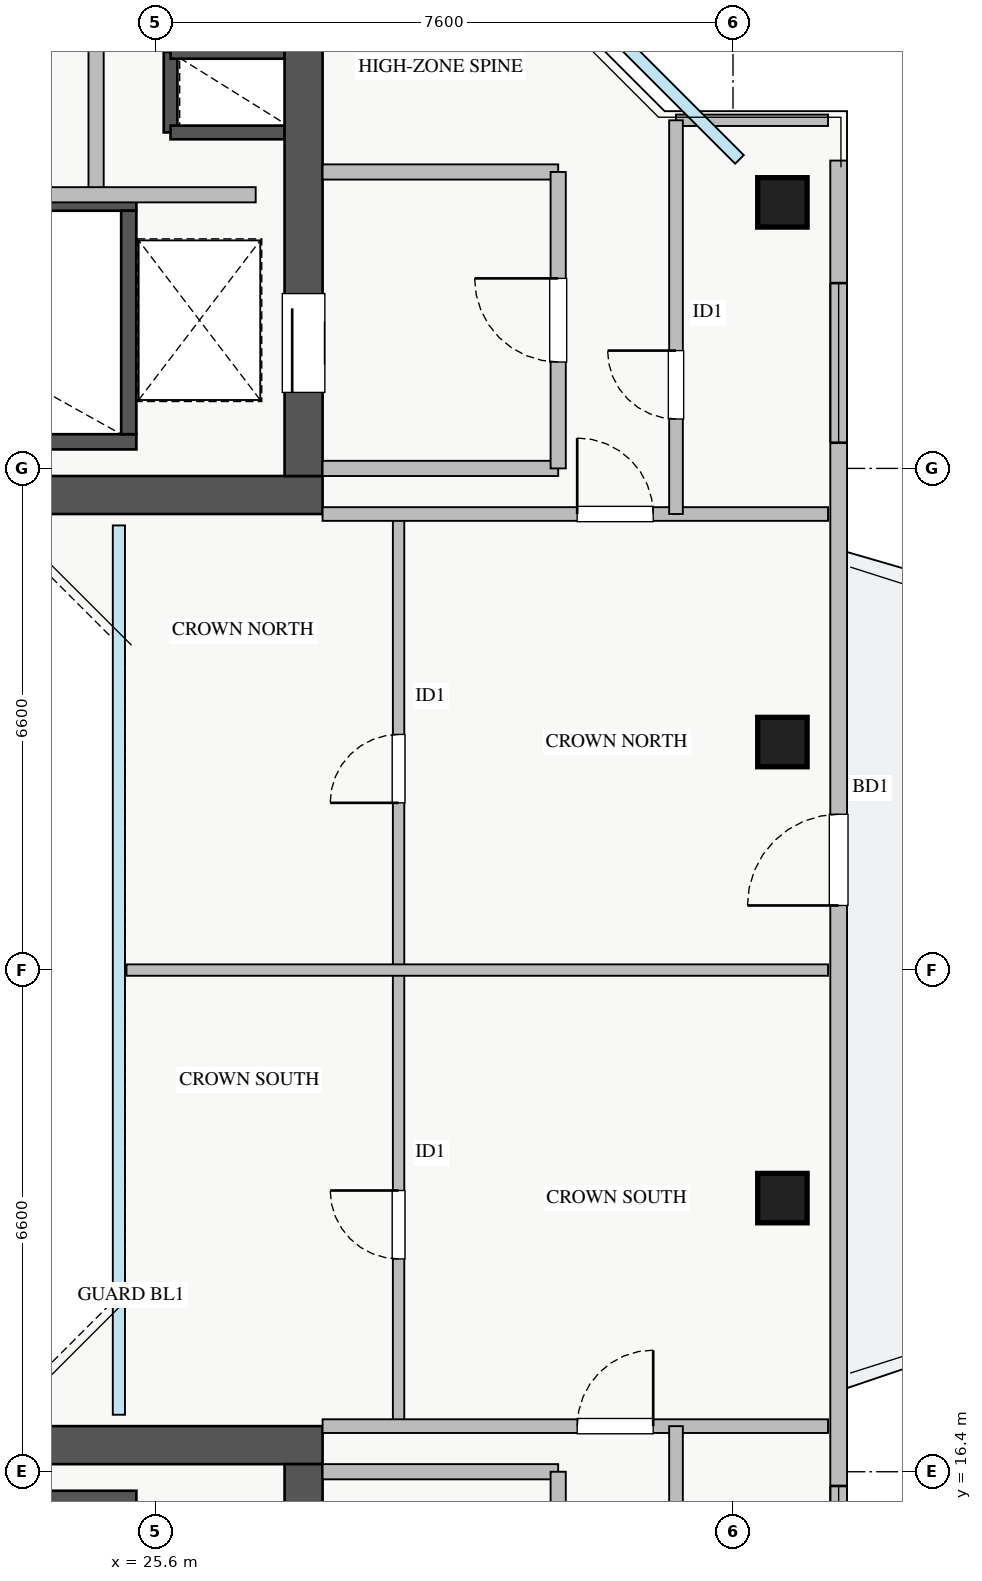
"""IFC4 building model, lengths in metres.
Left out: names, types, materials, properties, quantities, classifications, styles, units other than length and angle.
Written with IfcOpenShell. Run it as: python <this file> out.ifc"""

import sys

from ifc_helpers import new_model, si_unit, direction, frame, frame_2d, origin, origin_2d, place, context, subcontext, project, spatial, rectangle, extrude, source, transform, mapped, element, fill, save


model = new_model("IFC4")
c1 = context("Model", 3, precision=1e-05, world=origin(), true_north=direction((0.0, 1.0)))
c2 = subcontext(c1, "Body", "Model", "MODEL_VIEW")
j1 = project(units=[si_unit("LENGTHUNIT", "METRE"), si_unit("PLANEANGLEUNIT", "RADIAN")], contexts=[c1])
p1 = place(None, origin())
s1 = spatial("IfcSite", under=j1, at=p1, CompositionType="ELEMENT")
p2 = place(p1, origin())
s2 = spatial("IfcBuilding", under=s1, at=p2, CompositionType="ELEMENT")
p3 = place(p2, frame((0.0, 0.0, 237.25)))
s3 = spatial("IfcBuildingStorey", under=s2, at=p3, CompositionType="ELEMENT", Elevation=237.25)
p4 = place(p3, frame((25.8, 34.02, 0.0), z_axis=(0.0, 0.0, 1.0), x_axis=(0.0, 1.0, 0.0)))
e1 = element("IfcWall", 1, at=p4, inside=s3, PredefinedType="SHEAR", context=c2, shape_type="SweptSolid", body=[
    extrude(rectangle(XDim=1.06, YDim=0.18, at=frame_2d((0.53, 0.0))), origin(), (0.0, 0.0, 1.0), 3.07),
])
for number, where, z_axis, x_axis in (
    (2, (25.8, 35.08, 0.0), (0.0, 0.0, 1.0), (1.0, 0.0, 0.0)),
    (3, (25.8, 34.02, 0.0), (0.0, 0.0, 1.0), (1.0, 0.0, 0.0)),
):
    element("IfcWall", number, at=place(p3, frame(where, z_axis=z_axis, x_axis=x_axis)), inside=s3, PredefinedType="SHEAR", context=c2, shape_type="SweptSolid", body=[
        extrude(rectangle(XDim=1.5, YDim=0.18, at=frame_2d((0.75, 0.0))), origin(), (0.0, 0.0, 1.0), 3.07),
    ])
p5 = place(p3, frame((18.2, 29.95, 0.0), z_axis=(0.0, 0.0, 1.0), x_axis=(1.0, 0.0, 0.0)))
e4 = element("IfcWall", 4, at=p5, inside=s3, PredefinedType="SHEAR", context=c2, shape_type="SweptSolid", body=[
    extrude(rectangle(XDim=7.15, YDim=0.2, at=frame_2d((3.575, 0.0))), origin(), (0.0, 0.0, 1.0), 3.25),
])
p6 = place(p3, frame((18.2, 33.09, 0.0), z_axis=(0.0, 0.0, 1.0), x_axis=(1.0, 0.0, 0.0)))
e5 = element("IfcWall", 5, at=p6, inside=s3, PredefinedType="SHEAR", context=c2, shape_type="SweptSolid", body=[
    extrude(rectangle(XDim=7.15, YDim=0.2, at=frame_2d((3.575, 0.0))), origin(), (0.0, 0.0, 1.0), 3.25),
])
p7 = place(p6, frame((0.35, 0.0, 0.0)))
e6 = element("IfcOpeningElement", 6, at=p7, cuts=e5, PredefinedType="OPENING", context=c2, shape_type="SweptSolid", body=[
    extrude(rectangle(XDim=1.1, YDim=2.05, at=frame_2d((0.55, 1.025))), frame((0.0, 0.11, 0.0), z_axis=(0.0, -1.0, 0.0), x_axis=(1.0, 0.0, 0.0)), (0.0, 0.0, 1.0), 0.22),
])
p8 = place(p3, frame((25.25, 30.05, 0.0), z_axis=(0.0, 0.0, 1.0), x_axis=(0.0, 1.0, 0.0)))
e7 = element("IfcWall", 7, at=p8, inside=s3, PredefinedType="SHEAR", context=c2, shape_type="SweptSolid", body=[
    extrude(rectangle(XDim=2.94, YDim=0.2, at=frame_2d((1.47, 0.0))), origin(), (0.0, 0.0, 1.0), 3.25),
])
p9 = place(p3, frame((18.2, 16.05, 0.0), z_axis=(0.0, 0.0, 1.0), x_axis=(1.0, 0.0, 0.0)))
e8 = element("IfcWall", 8, at=p9, inside=s3, PredefinedType="SHEAR", context=c2, shape_type="SweptSolid", body=[
    extrude(rectangle(XDim=7.15, YDim=0.2, at=frame_2d((3.575, 0.0))), origin(), (0.0, 0.0, 1.0), 3.25),
])
p10 = place(p3, frame((10.2, 29.25, 0.0), z_axis=(0.0, 0.0, 1.0), x_axis=(1.0, 0.0, 0.0)))
e9 = element("IfcWall", 9, at=p10, inside=s3, PredefinedType="SHEAR", context=c2, shape_type="SweptSolid", body=[
    extrude(rectangle(XDim=17.6, YDim=0.5, at=frame_2d((8.8, 0.0))), origin(), (0.0, 0.0, 1.0), 3.25),
])
p11 = place(p3, frame((27.55, 29.5, 0.0), z_axis=(0.0, 0.0, 1.0), x_axis=(0.0, 1.0, 0.0)))
e10 = element("IfcWall", 10, at=p11, inside=s3, PredefinedType="SHEAR", context=c2, shape_type="SweptSolid", body=[
    extrude(rectangle(XDim=6.2, YDim=0.5, at=frame_2d((3.1, 0.0))), origin(), (0.0, 0.0, 1.0), 3.25),
])
p12 = place(p11, frame((1.1, 0.0, 0.0)))
e11 = element("IfcOpeningElement", 11, at=p12, cuts=e10, PredefinedType="OPENING", context=c2, shape_type="SweptSolid", body=[
    extrude(rectangle(XDim=1.3, YDim=2.05, at=frame_2d((0.65, 1.025))), frame((0.0, 0.26, 0.0), z_axis=(0.0, -1.0, 0.0), x_axis=(1.0, 0.0, 0.0)), (0.0, 0.0, 1.0), 0.52),
])
p13 = place(p3, frame((10.2, 16.75, 0.0), z_axis=(0.0, 0.0, 1.0), x_axis=(1.0, 0.0, 0.0)))
e12 = element("IfcWall", 12, at=p13, inside=s3, PredefinedType="SHEAR", context=c2, shape_type="SweptSolid", body=[
    extrude(rectangle(XDim=17.6, YDim=0.5, at=frame_2d((8.8, 0.0))), origin(), (0.0, 0.0, 1.0), 3.25),
])
p14 = place(p3, frame((27.55, 10.3, 0.0), z_axis=(0.0, 0.0, 1.0), x_axis=(0.0, 1.0, 0.0)))
e13 = element("IfcWall", 13, at=p14, inside=s3, PredefinedType="SHEAR", context=c2, shape_type="SweptSolid", body=[
    extrude(rectangle(XDim=6.2, YDim=0.5, at=frame_2d((3.1, 0.0))), origin(), (0.0, 0.0, 1.0), 3.25),
])
p15 = place(p14, frame((2.1, 0.0, 0.0)))
e14 = element("IfcOpeningElement", 14, at=p15, cuts=e13, PredefinedType="OPENING", context=c2, shape_type="SweptSolid", body=[
    extrude(rectangle(XDim=1.3, YDim=2.05, at=frame_2d((0.65, 1.025))), frame((0.0, 0.26, 0.0), z_axis=(0.0, -1.0, 0.0), x_axis=(1.0, 0.0, 0.0)), (0.0, 0.0, 1.0), 0.52),
])
m1 = source(origin(), c2, "Body", "SweptSolid", [
    extrude(rectangle(XDim=0.65, YDim=0.65, at=origin_2d()), origin(), (0.0, 0.0, 1.0), 3.25),
])
for number, where, z_axis, x_axis in (
    (15, (33.85, 20.0, 0.0), (0.0, 0.0, 1.0), (1.0, 0.0, 0.0)),
    (16, (33.85, 26.0, 0.0), (0.0, 0.0, 1.0), (1.0, 0.0, 0.0)),
    (17, (33.85, 33.1, 0.0), (0.0, 0.0, 1.0), (1.0, 0.0, 0.0)),
):
    element("IfcColumn", number, at=place(p3, frame(where, z_axis=z_axis, x_axis=x_axis)), inside=s3, PredefinedType="COLUMN", context=c2, shape_type="MappedRepresentation", body=[
        mapped(m1, transform((0.0, 0.0, 0.0), x_axis=(1.0, 0.0, 0.0), y_axis=(0.0, 1.0, 0.0), z_axis=(0.0, 0.0, 1.0), scale=1.0)),
    ])
p16 = place(p3, frame((34.59, 12.35, 0.0), z_axis=(0.0, 0.0, 1.0), x_axis=(0.0, 1.0, 0.0)))
e18 = element("IfcWall", 18, at=p16, inside=s3, PredefinedType="STANDARD", context=c2, shape_type="SweptSolid", body=[
    extrude(rectangle(XDim=21.3, YDim=0.22, at=frame_2d((10.65, 0.0))), origin(), (0.0, 0.0, 1.0), 2.61),
])
p17 = place(p16, frame((11.5, 0.0, 0.0)))
e19 = element("IfcOpeningElement", 19, at=p17, cuts=e18, PredefinedType="OPENING", context=c2, shape_type="SweptSolid", body=[
    extrude(rectangle(XDim=1.2, YDim=2.1, at=frame_2d((0.6, 1.05))), frame((0.0, 0.12, 0.0), z_axis=(0.0, -1.0, 0.0), x_axis=(1.0, 0.0, 0.0)), (0.0, 0.0, 1.0), 0.24),
])
p18 = place(p16, frame((1.463, 0.0, 0.9)))
e20 = element("IfcOpeningElement", 20, at=p18, cuts=e18, PredefinedType="OPENING", context=c2, shape_type="SweptSolid", body=[
    extrude(rectangle(XDim=2.4, YDim=1.48, at=frame_2d((1.2, 0.74))), frame((0.0, 0.12, 0.0), z_axis=(0.0, -1.0, 0.0), x_axis=(1.0, 0.0, 0.0)), (0.0, 0.0, 1.0), 0.24),
])
p19 = place(p16, frame((17.588, 0.0, 0.9)))
e21 = element("IfcOpeningElement", 21, at=p19, cuts=e18, PredefinedType="OPENING", context=c2, shape_type="SweptSolid", body=[
    extrude(rectangle(XDim=2.1, YDim=1.48, at=frame_2d((1.05, 0.74))), frame((0.0, 0.12, 0.0), z_axis=(0.0, -1.0, 0.0), x_axis=(1.0, 0.0, 0.0)), (0.0, 0.0, 1.0), 0.24),
])
for number, where, z_axis, x_axis in (
    (22, (27.8, 29.6, 0.0), (0.0, 0.0, 1.0), (1.0, 0.0, 0.0)),
    (23, (27.8, 33.5, 0.0), (0.0, 0.0, 1.0), (1.0, 0.0, 0.0)),
):
    element("IfcWall", number, at=place(p3, frame(where, z_axis=z_axis, x_axis=x_axis)), inside=s3, PredefinedType="PARTITIONING", context=c2, shape_type="SweptSolid", body=[
        extrude(rectangle(XDim=3.1, YDim=0.2, at=frame_2d((1.55, 0.0))), origin(), (0.0, 0.0, 1.0), 3.07),
    ])
p20 = place(p3, frame((30.9, 29.6, 0.0), z_axis=(0.0, 0.0, 1.0), x_axis=(0.0, 1.0, 0.0)))
e24 = element("IfcWall", 24, at=p20, inside=s3, PredefinedType="PARTITIONING", context=c2, shape_type="SweptSolid", body=[
    extrude(rectangle(XDim=3.9, YDim=0.2, at=frame_2d((1.95, 0.0))), origin(), (0.0, 0.0, 1.0), 2.815),
])
p21 = place(p20, frame((1.4, 0.0, 0.0)))
e25 = element("IfcOpeningElement", 25, at=p21, cuts=e24, PredefinedType="OPENING", context=c2, shape_type="SweptSolid", body=[
    extrude(rectangle(XDim=1.1, YDim=2.05, at=frame_2d((0.55, 1.025))), frame((0.0, 0.11, 0.0), z_axis=(0.0, -1.0, 0.0), x_axis=(1.0, 0.0, 0.0)), (0.0, 0.0, 1.0), 0.22),
])
p22 = place(p3, frame((27.8, 16.4, 0.0), z_axis=(0.0, 0.0, 1.0), x_axis=(1.0, 0.0, 0.0)))
e26 = element("IfcWall", 26, at=p22, inside=s3, PredefinedType="PARTITIONING", context=c2, shape_type="SweptSolid", body=[
    extrude(rectangle(XDim=3.1, YDim=0.2, at=frame_2d((1.55, 0.0))), origin(), (0.0, 0.0, 1.0), 3.07),
])
p23 = place(p3, frame((30.9, 12.5, 0.0), z_axis=(0.0, 0.0, 1.0), x_axis=(0.0, 1.0, 0.0)))
e27 = element("IfcWall", 27, at=p23, inside=s3, PredefinedType="PARTITIONING", context=c2, shape_type="SweptSolid", body=[
    extrude(rectangle(XDim=3.9, YDim=0.2, at=frame_2d((1.95, 0.0))), origin(), (0.0, 0.0, 1.0), 2.815),
])
p24 = place(p23, frame((1.4, 0.0, 0.0)))
e28 = element("IfcOpeningElement", 28, at=p24, cuts=e27, PredefinedType="OPENING", context=c2, shape_type="SweptSolid", body=[
    extrude(rectangle(XDim=1.1, YDim=2.05, at=frame_2d((0.55, 1.025))), frame((0.0, 0.11, 0.0), z_axis=(0.0, -1.0, 0.0), x_axis=(1.0, 0.0, 0.0)), (0.0, 0.0, 1.0), 0.22),
])
p25 = place(p3, frame((24.82, 33.2, 0.0), z_axis=(0.0, 0.0, 1.0), x_axis=(0.0, 1.0, 0.0)))
e29 = element("IfcWall", 29, at=p25, inside=s3, PredefinedType="PARTITIONING", context=c2, shape_type="SweptSolid", body=[
    extrude(rectangle(XDim=2.65, YDim=0.2, at=frame_2d((1.325, 0.0))), origin(), (0.0, 0.0, 1.0), 3.07),
])
p26 = place(p3, frame((21.75, 33.2, 0.0), z_axis=(0.0, 0.0, 1.0), x_axis=(1.0, 0.0, 0.0)))
e30 = element("IfcWall", 30, at=p26, inside=s3, PredefinedType="PARTITIONING", context=c2, shape_type="SweptSolid", body=[
    extrude(rectangle(XDim=5.17, YDim=0.2, at=frame_2d((2.585, 0.0))), origin(), (0.0, 0.0, 1.0), 3.07),
])
p27 = place(p3, frame((28.8, 17.0, 0.0), z_axis=(0.0, 0.0, 1.0), x_axis=(0.0, 1.0, 0.0)))
e31 = element("IfcWall", 31, at=p27, inside=s3, PredefinedType="PARTITIONING", context=c2, shape_type="SweptSolid", body=[
    extrude(rectangle(XDim=6.0, YDim=0.15, at=frame_2d((3.0, 0.0))), origin(), (0.0, 0.0, 1.0), 3.07),
])
p28 = place(p27, frame((2.2, 0.0, 0.0)))
e32 = element("IfcOpeningElement", 32, at=p28, cuts=e31, PredefinedType="OPENING", context=c2, shape_type="SweptSolid", body=[
    extrude(rectangle(XDim=0.9, YDim=2.05, at=frame_2d((0.45, 1.025))), frame((0.0, 0.085, 0.0), z_axis=(0.0, -1.0, 0.0), x_axis=(1.0, 0.0, 0.0)), (0.0, 0.0, 1.0), 0.17),
])
p29 = place(p3, frame((28.8, 23.0, 0.0), z_axis=(0.0, 0.0, 1.0), x_axis=(0.0, 1.0, 0.0)))
e33 = element("IfcWall", 33, at=p29, inside=s3, PredefinedType="PARTITIONING", context=c2, shape_type="SweptSolid", body=[
    extrude(rectangle(XDim=6.0, YDim=0.15, at=frame_2d((3.0, 0.0))), origin(), (0.0, 0.0, 1.0), 3.07),
])
p30 = place(p29, frame((2.2, 0.0, 0.0)))
e34 = element("IfcOpeningElement", 34, at=p30, cuts=e33, PredefinedType="OPENING", context=c2, shape_type="SweptSolid", body=[
    extrude(rectangle(XDim=0.9, YDim=2.05, at=frame_2d((0.45, 1.025))), frame((0.0, 0.085, 0.0), z_axis=(0.0, -1.0, 0.0), x_axis=(1.0, 0.0, 0.0)), (0.0, 0.0, 1.0), 0.17),
])
p31 = place(p3, frame((25.22, 23.0, 0.0), z_axis=(0.0, 0.0, 1.0), x_axis=(1.0, 0.0, 0.0)))
e35 = element("IfcWall", 35, at=p31, inside=s3, PredefinedType="PARTITIONING", context=c2, shape_type="SweptSolid", body=[
    extrude(rectangle(XDim=9.23, YDim=0.15, at=frame_2d((4.615, 0.0))), origin(), (0.0, 0.0, 1.0), 3.07),
])
p32 = place(p3, frame((27.8, 17.0, 0.0), z_axis=(0.0, 0.0, 1.0), x_axis=(1.0, 0.0, 0.0)))
e36 = element("IfcWall", 36, at=p32, inside=s3, PredefinedType="PARTITIONING", context=c2, shape_type="SweptSolid", body=[
    extrude(rectangle(XDim=6.65, YDim=0.18, at=frame_2d((3.325, 0.0))), origin(), (0.0, 0.0, 1.0), 3.07),
])
p33 = place(p32, frame((3.35, 0.0, 0.0)))
e37 = element("IfcOpeningElement", 37, at=p33, cuts=e36, PredefinedType="OPENING", context=c2, shape_type="SweptSolid", body=[
    extrude(rectangle(XDim=1.0, YDim=2.05, at=frame_2d((0.5, 1.025))), frame((0.0, 0.1, 0.0), z_axis=(0.0, -1.0, 0.0), x_axis=(1.0, 0.0, 0.0)), (0.0, 0.0, 1.0), 0.2),
])
p34 = place(p3, frame((27.8, 29.0, 0.0), z_axis=(0.0, 0.0, 1.0), x_axis=(1.0, 0.0, 0.0)))
e38 = element("IfcWall", 38, at=p34, inside=s3, PredefinedType="PARTITIONING", context=c2, shape_type="SweptSolid", body=[
    extrude(rectangle(XDim=6.65, YDim=0.18, at=frame_2d((3.325, 0.0))), origin(), (0.0, 0.0, 1.0), 3.07),
])
p35 = place(p34, frame((3.35, 0.0, 0.0)))
e39 = element("IfcOpeningElement", 39, at=p35, cuts=e38, PredefinedType="OPENING", context=c2, shape_type="SweptSolid", body=[
    extrude(rectangle(XDim=1.0, YDim=2.05, at=frame_2d((0.5, 1.025))), frame((0.0, 0.1, 0.0), z_axis=(0.0, -1.0, 0.0), x_axis=(1.0, 0.0, 0.0)), (0.0, 0.0, 1.0), 0.2),
])
p36 = place(p3, frame((32.45, 34.18, 0.0), z_axis=(0.0, 0.0, 1.0), x_axis=(1.0, 0.0, 0.0)))
e40 = element("IfcWall", 40, at=p36, inside=s3, PredefinedType="PARTITIONING", context=c2, shape_type="SweptSolid", body=[
    extrude(rectangle(XDim=2.0, YDim=0.15, at=frame_2d((1.0, 0.0))), origin(), (0.0, 0.0, 1.0), 3.07),
])
p37 = place(p3, frame((32.45, 29.0, 0.0), z_axis=(0.0, 0.0, 1.0), x_axis=(0.0, 1.0, 0.0)))
e41 = element("IfcWall", 41, at=p37, inside=s3, PredefinedType="PARTITIONING", context=c2, shape_type="SweptSolid", body=[
    extrude(rectangle(XDim=5.18, YDim=0.18, at=frame_2d((2.59, 0.0))), origin(), (0.0, 0.0, 1.0), 3.07),
])
p38 = place(p37, frame((1.25, 0.0, 0.0)))
e42 = element("IfcOpeningElement", 42, at=p38, cuts=e41, PredefinedType="OPENING", context=c2, shape_type="SweptSolid", body=[
    extrude(rectangle(XDim=0.9, YDim=2.05, at=frame_2d((0.45, 1.025))), frame((0.0, 0.1, 0.0), z_axis=(0.0, -1.0, 0.0), x_axis=(1.0, 0.0, 0.0)), (0.0, 0.0, 1.0), 0.2),
])
p39 = place(p3, frame((32.45, 11.82, 0.0), z_axis=(0.0, 0.0, 1.0), x_axis=(0.0, 1.0, 0.0)))
e43 = element("IfcWall", 43, at=p39, inside=s3, PredefinedType="PARTITIONING", context=c2, shape_type="SweptSolid", body=[
    extrude(rectangle(XDim=5.18, YDim=0.18, at=frame_2d((2.59, 0.0))), origin(), (0.0, 0.0, 1.0), 3.07),
])
p40 = place(p39, frame((1.25, 0.0, 0.0)))
e44 = element("IfcOpeningElement", 44, at=p40, cuts=e43, PredefinedType="OPENING", context=c2, shape_type="SweptSolid", body=[
    extrude(rectangle(XDim=0.9, YDim=2.05, at=frame_2d((0.45, 1.025))), frame((0.0, 0.1, 0.0), z_axis=(0.0, -1.0, 0.0), x_axis=(1.0, 0.0, 0.0)), (0.0, 0.0, 1.0), 0.2),
])
m2 = source(origin(), c2, "Body", "SweptSolid", [
    extrude(rectangle(XDim=1.2, YDim=2.1, at=frame_2d((0.6, 1.05))), frame((0.0, 0.025, 0.0), z_axis=(0.0, -1.0, 0.0), x_axis=(1.0, 0.0, 0.0)), (0.0, 0.0, 1.0), 0.05),
])
p41 = place(p17, origin())
e45 = element("IfcDoor", 45, at=p41, inside=s3, OperationType="SINGLE_SWING_LEFT", PredefinedType="DOOR", context=c2, shape_type="MappedRepresentation", body=[
    mapped(m2, transform((0.0, 0.0, 0.0), x_axis=(1.0, 0.0, 0.0), y_axis=(0.0, 1.0, 0.0), z_axis=(0.0, 0.0, 1.0), scale=1.0)),
])
fill(e19, e45)
m3 = source(origin(), c2, "Body", "SweptSolid", [
    extrude(rectangle(XDim=2.4, YDim=1.48, at=frame_2d((1.2, 0.74))), frame((0.0, 0.03, 0.0), z_axis=(0.0, -1.0, 0.0), x_axis=(1.0, 0.0, 0.0)), (0.0, 0.0, 1.0), 0.06),
])
p42 = place(p18, origin())
e46 = element("IfcWindow", 46, at=p42, inside=s3, PartitioningType="TRIPLE_PANEL_VERTICAL", PredefinedType="WINDOW", context=c2, shape_type="MappedRepresentation", body=[
    mapped(m3, transform((0.0, 0.0, 0.0), x_axis=(1.0, 0.0, 0.0), y_axis=(0.0, 1.0, 0.0), z_axis=(0.0, 0.0, 1.0), scale=1.0)),
])
fill(e20, e46)
m4 = source(origin(), c2, "Body", "SweptSolid", [
    extrude(rectangle(XDim=2.1, YDim=1.48, at=frame_2d((1.05, 0.74))), frame((0.0, 0.03, 0.0), z_axis=(0.0, -1.0, 0.0), x_axis=(1.0, 0.0, 0.0)), (0.0, 0.0, 1.0), 0.06),
])
p43 = place(p19, origin())
e47 = element("IfcWindow", 47, at=p43, inside=s3, PartitioningType="TRIPLE_PANEL_VERTICAL", PredefinedType="WINDOW", context=c2, shape_type="MappedRepresentation", body=[
    mapped(m4, transform((0.0, 0.0, 0.0), x_axis=(1.0, 0.0, 0.0), y_axis=(0.0, 1.0, 0.0), z_axis=(0.0, 0.0, 1.0), scale=1.0)),
])
fill(e21, e47)
m5 = source(origin(), c2, "Body", "SweptSolid", [
    extrude(rectangle(XDim=1.3, YDim=2.05, at=frame_2d((0.65, 1.025))), frame((0.0, 0.025, 0.0), z_axis=(0.0, -1.0, 0.0), x_axis=(1.0, 0.0, 0.0)), (0.0, 0.0, 1.0), 0.05),
])
p44 = place(p12, origin())
e48 = element("IfcDoor", 48, at=p44, inside=s3, OperationType="SLIDING_TO_LEFT", PredefinedType="DOOR", context=c2, shape_type="MappedRepresentation", body=[
    mapped(m5, transform((0.0, 0.0, 0.0), x_axis=(1.0, 0.0, 0.0), y_axis=(0.0, 1.0, 0.0), z_axis=(0.0, 0.0, 1.0), scale=1.0)),
])
fill(e11, e48)
m6 = source(origin(), c2, "Body", "SweptSolid", [
    extrude(rectangle(XDim=1.1, YDim=2.05, at=frame_2d((0.55, 1.025))), frame((0.0, 0.025, 0.0), z_axis=(0.0, -1.0, 0.0), x_axis=(1.0, 0.0, 0.0)), (0.0, 0.0, 1.0), 0.05),
])
p45 = place(p21, origin())
e49 = element("IfcDoor", 49, at=p45, inside=s3, OperationType="SINGLE_SWING_RIGHT", PredefinedType="DOOR", context=c2, shape_type="MappedRepresentation", body=[
    mapped(m6, transform((0.0, 0.0, 0.0), x_axis=(1.0, 0.0, 0.0), y_axis=(0.0, 1.0, 0.0), z_axis=(0.0, 0.0, 1.0), scale=1.0)),
])
fill(e25, e49)
m7 = source(origin(), c2, "Body", "SweptSolid", [
    extrude(rectangle(XDim=0.9, YDim=2.05, at=frame_2d((0.45, 1.025))), frame((0.0, 0.025, 0.0), z_axis=(0.0, -1.0, 0.0), x_axis=(1.0, 0.0, 0.0)), (0.0, 0.0, 1.0), 0.05),
])
p46 = place(p28, origin())
e50 = element("IfcDoor", 50, at=p46, inside=s3, OperationType="SINGLE_SWING_RIGHT", PredefinedType="DOOR", context=c2, shape_type="MappedRepresentation", body=[
    mapped(m7, transform((0.0, 0.0, 0.0), x_axis=(1.0, 0.0, 0.0), y_axis=(0.0, 1.0, 0.0), z_axis=(0.0, 0.0, 1.0), scale=1.0)),
])
fill(e32, e50)
p47 = place(p30, origin())
e51 = element("IfcDoor", 51, at=p47, inside=s3, OperationType="SINGLE_SWING_LEFT", PredefinedType="DOOR", context=c2, shape_type="MappedRepresentation", body=[
    mapped(m7, transform((0.0, 0.0, 0.0), x_axis=(1.0, 0.0, 0.0), y_axis=(0.0, 1.0, 0.0), z_axis=(0.0, 0.0, 1.0), scale=1.0)),
])
fill(e34, e51)
m8 = source(origin(), c2, "Body", "SweptSolid", [
    extrude(rectangle(XDim=1.0, YDim=2.05, at=frame_2d((0.5, 1.025))), frame((0.0, 0.025, 0.0), z_axis=(0.0, -1.0, 0.0), x_axis=(1.0, 0.0, 0.0)), (0.0, 0.0, 1.0), 0.05),
])
p48 = place(p33, origin())
e52 = element("IfcDoor", 52, at=p48, inside=s3, OperationType="SINGLE_SWING_RIGHT", PredefinedType="DOOR", context=c2, shape_type="MappedRepresentation", body=[
    mapped(m8, transform((0.0, 0.0, 0.0), x_axis=(1.0, 0.0, 0.0), y_axis=(0.0, 1.0, 0.0), z_axis=(0.0, 0.0, 1.0), scale=1.0)),
])
fill(e37, e52)
p49 = place(p35, origin())
e53 = element("IfcDoor", 53, at=p49, inside=s3, OperationType="SINGLE_SWING_LEFT", PredefinedType="DOOR", context=c2, shape_type="MappedRepresentation", body=[
    mapped(m8, transform((0.0, 0.0, 0.0), x_axis=(1.0, 0.0, 0.0), y_axis=(0.0, 1.0, 0.0), z_axis=(0.0, 0.0, 1.0), scale=1.0)),
])
fill(e39, e53)
p50 = place(p38, origin())
e54 = element("IfcDoor", 54, at=p50, inside=s3, OperationType="SINGLE_SWING_RIGHT", PredefinedType="DOOR", context=c2, shape_type="MappedRepresentation", body=[
    mapped(m7, transform((0.0, 0.0, 0.0), x_axis=(1.0, 0.0, 0.0), y_axis=(0.0, 1.0, 0.0), z_axis=(0.0, 0.0, 1.0), scale=1.0)),
])
fill(e42, e54)
save(model, sys.argv[1])
